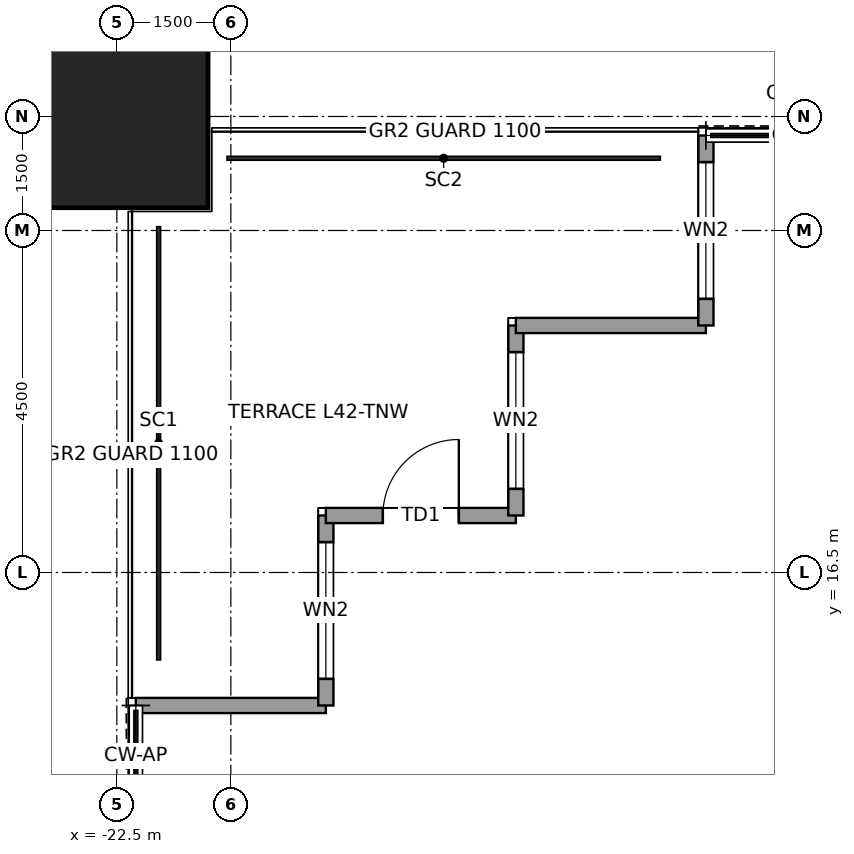
"""IFC4 building model, lengths in metres.
Left out: names, types, materials, properties, quantities, classifications, styles, units other than length and angle.
Written with IfcOpenShell. Run it as: python <this file> out.ifc"""

import sys

from ifc_helpers import new_model, si_unit, direction, frame, frame_2d, origin, origin_2d, place, context, subcontext, project, spatial, rectangle, hollow_rectangle, extrude, element, fill, save


model = new_model("IFC4")
c1 = context("Model", 3, precision=1e-05, world=origin(), true_north=direction((0.0, 1.0)))
c2 = subcontext(c1, "Body", "Model", "MODEL_VIEW")
j1 = project(units=[si_unit("LENGTHUNIT", "METRE"), si_unit("PLANEANGLEUNIT", "RADIAN")], contexts=[c1])
p1 = place(None, origin())
s1 = spatial("IfcSite", under=j1, at=p1, CompositionType="ELEMENT")
p2 = place(p1, origin())
s2 = spatial("IfcBuilding", under=s1, at=p2, CompositionType="ELEMENT")
p3 = place(p2, frame((0.0, 0.0, 201.9)))
s3 = spatial("IfcBuildingStorey", under=s2, at=p3, CompositionType="ELEMENT", Elevation=201.9)
p4 = place(p3, frame((-22.5, 22.5, 0.0), z_axis=(0.0, 0.0, 1.0), x_axis=(1.0, 0.0, 0.0)))
e1 = element("IfcColumn", 1, at=p4, inside=s3, PredefinedType="COLUMN", context=c2, shape_type="SweptSolid", body=[
    extrude(hollow_rectangle(XDim=2.4, YDim=2.4, WallThickness=0.12, at=origin_2d()), origin(), (0.0, 0.0, 1.0), 4.0),
])
p5 = place(p3, frame((-22.25, 14.75, 0.0), z_axis=(0.0, 0.0, 1.0), x_axis=(1.0, 0.0, 0.0)))
e2 = element("IfcWall", 2, at=p5, inside=s3, PredefinedType="SOLIDWALL", context=c2, shape_type="SweptSolid", body=[
    extrude(rectangle(XDim=2.5, YDim=0.2, at=frame_2d((1.25, 0.0))), origin(), (0.0, 0.0, 1.0), 3.85),
])
p6 = place(p3, frame((-19.75, 14.75, 0.0), z_axis=(0.0, 0.0, 1.0), x_axis=(0.0, 1.0, 0.0)))
e3 = element("IfcWall", 3, at=p6, inside=s3, PredefinedType="SOLIDWALL", context=c2, shape_type="SweptSolid", body=[
    extrude(rectangle(XDim=2.5, YDim=0.2, at=frame_2d((1.25, 0.0))), origin(), (0.0, 0.0, 1.0), 3.85),
])
p7 = place(p6, frame((0.35, 0.0, 0.3)))
e4 = element("IfcOpeningElement", 4, at=p7, cuts=e3, PredefinedType="OPENING", context=c2, shape_type="SweptSolid", body=[
    extrude(rectangle(XDim=1.8, YDim=2.4, at=frame_2d((0.9, 1.2))), frame((0.0, 0.11, 0.0), z_axis=(0.0, -1.0, 0.0), x_axis=(1.0, 0.0, 0.0)), (0.0, 0.0, 1.0), 0.22),
])
p8 = place(p3, frame((-19.75, 17.25, 0.0), z_axis=(0.0, 0.0, 1.0), x_axis=(1.0, 0.0, 0.0)))
e5 = element("IfcWall", 5, at=p8, inside=s3, PredefinedType="SOLIDWALL", context=c2, shape_type="SweptSolid", body=[
    extrude(rectangle(XDim=2.5, YDim=0.2, at=frame_2d((1.25, 0.0))), origin(), (0.0, 0.0, 1.0), 3.85),
])
p9 = place(p8, frame((0.75, 0.0, 0.0)))
e6 = element("IfcOpeningElement", 6, at=p9, cuts=e5, PredefinedType="OPENING", context=c2, shape_type="SweptSolid", body=[
    extrude(rectangle(XDim=1.0, YDim=2.4, at=frame_2d((0.5, 1.2))), frame((0.0, 0.11, 0.0), z_axis=(0.0, -1.0, 0.0), x_axis=(1.0, 0.0, 0.0)), (0.0, 0.0, 1.0), 0.22),
])
p10 = place(p3, frame((-17.25, 17.25, 0.0), z_axis=(0.0, 0.0, 1.0), x_axis=(0.0, 1.0, 0.0)))
e7 = element("IfcWall", 7, at=p10, inside=s3, PredefinedType="SOLIDWALL", context=c2, shape_type="SweptSolid", body=[
    extrude(rectangle(XDim=2.5, YDim=0.2, at=frame_2d((1.25, 0.0))), origin(), (0.0, 0.0, 1.0), 3.85),
])
p11 = place(p10, frame((0.35, 0.0, 0.3)))
e8 = element("IfcOpeningElement", 8, at=p11, cuts=e7, PredefinedType="OPENING", context=c2, shape_type="SweptSolid", body=[
    extrude(rectangle(XDim=1.8, YDim=2.4, at=frame_2d((0.9, 1.2))), frame((0.0, 0.11, 0.0), z_axis=(0.0, -1.0, 0.0), x_axis=(1.0, 0.0, 0.0)), (0.0, 0.0, 1.0), 0.22),
])
p12 = place(p3, frame((-17.25, 19.75, 0.0), z_axis=(0.0, 0.0, 1.0), x_axis=(1.0, 0.0, 0.0)))
e9 = element("IfcWall", 9, at=p12, inside=s3, PredefinedType="SOLIDWALL", context=c2, shape_type="SweptSolid", body=[
    extrude(rectangle(XDim=2.5, YDim=0.2, at=frame_2d((1.25, 0.0))), origin(), (0.0, 0.0, 1.0), 3.85),
])
p13 = place(p3, frame((-14.75, 19.75, 0.0), z_axis=(0.0, 0.0, 1.0), x_axis=(0.0, 1.0, 0.0)))
e10 = element("IfcWall", 10, at=p13, inside=s3, PredefinedType="SOLIDWALL", context=c2, shape_type="SweptSolid", body=[
    extrude(rectangle(XDim=2.5, YDim=0.2, at=frame_2d((1.25, 0.0))), origin(), (0.0, 0.0, 1.0), 3.85),
])
p14 = place(p13, frame((0.35, 0.0, 0.3)))
e11 = element("IfcOpeningElement", 11, at=p14, cuts=e10, PredefinedType="OPENING", context=c2, shape_type="SweptSolid", body=[
    extrude(rectangle(XDim=1.8, YDim=2.4, at=frame_2d((0.9, 1.2))), frame((0.0, 0.11, 0.0), z_axis=(0.0, -1.0, 0.0), x_axis=(1.0, 0.0, 0.0)), (0.0, 0.0, 1.0), 0.22),
])
p15 = place(p7, origin())
e12 = element("IfcWindow", 12, at=p15, inside=s3, PartitioningType="SINGLE_PANEL", PredefinedType="WINDOW", context=c2, shape_type="SweptSolid", body=[
    extrude(rectangle(XDim=1.8, YDim=2.4, at=frame_2d((0.9, 1.2))), frame((0.0, 0.03, 0.0), z_axis=(0.0, -1.0, 0.0), x_axis=(1.0, 0.0, 0.0)), (0.0, 0.0, 1.0), 0.06),
])
fill(e4, e12)
p16 = place(p9, origin())
e13 = element("IfcDoor", 13, at=p16, inside=s3, OperationType="SINGLE_SWING_RIGHT", PredefinedType="DOOR", context=c2, shape_type="SweptSolid", body=[
    extrude(rectangle(XDim=1.0, YDim=2.4, at=frame_2d((0.5, 1.2))), frame((0.0, 0.025, 0.0), z_axis=(0.0, -1.0, 0.0), x_axis=(1.0, 0.0, 0.0)), (0.0, 0.0, 1.0), 0.05),
])
fill(e6, e13)
p17 = place(p11, origin())
e14 = element("IfcWindow", 14, at=p17, inside=s3, PartitioningType="SINGLE_PANEL", PredefinedType="WINDOW", context=c2, shape_type="SweptSolid", body=[
    extrude(rectangle(XDim=1.8, YDim=2.4, at=frame_2d((0.9, 1.2))), frame((0.0, 0.03, 0.0), z_axis=(0.0, -1.0, 0.0), x_axis=(1.0, 0.0, 0.0)), (0.0, 0.0, 1.0), 0.06),
])
fill(e8, e14)
p18 = place(p14, origin())
e15 = element("IfcWindow", 15, at=p18, inside=s3, PartitioningType="SINGLE_PANEL", PredefinedType="WINDOW", context=c2, shape_type="SweptSolid", body=[
    extrude(rectangle(XDim=1.8, YDim=2.4, at=frame_2d((0.9, 1.2))), frame((0.0, 0.03, 0.0), z_axis=(0.0, -1.0, 0.0), x_axis=(1.0, 0.0, 0.0)), (0.0, 0.0, 1.0), 0.06),
])
fill(e11, e15)
save(model, sys.argv[1])
